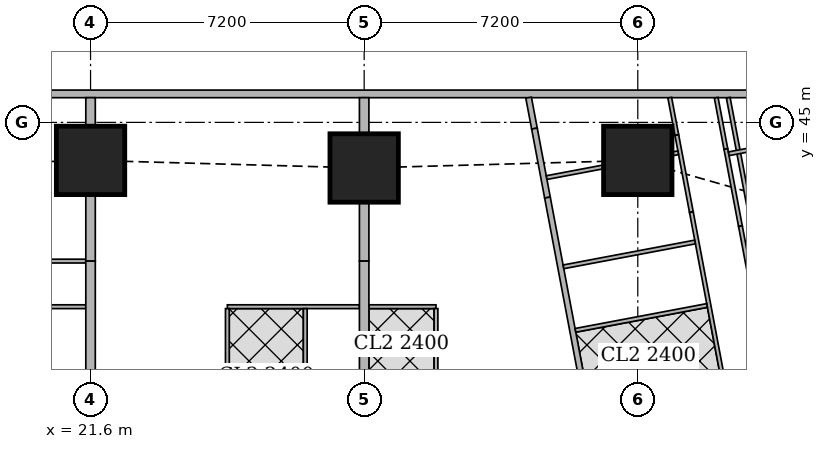
"""IFC4 building model, lengths in metres.
Left out: names, types, materials, properties, quantities, classifications, styles, units other than length and angle.
Written with IfcOpenShell. Run it as: python <this file> out.ifc"""

import sys

from ifc_helpers import new_model, si_unit, direction, frame, frame_2d, origin, origin_2d, place, context, subcontext, project, spatial, rectangle, extrude, element, fill, save


model = new_model("IFC4")
c1 = context("Model", 3, precision=1e-05, world=origin(), true_north=direction((0.0, 1.0)))
c2 = subcontext(c1, "Body", "Model", "MODEL_VIEW")
j1 = project(units=[si_unit("LENGTHUNIT", "METRE"), si_unit("PLANEANGLEUNIT", "RADIAN")], contexts=[c1])
p1 = place(None, origin())
s1 = spatial("IfcSite", under=j1, at=p1, CompositionType="ELEMENT")
p2 = place(p1, origin())
s2 = spatial("IfcBuilding", under=s1, at=p2, CompositionType="ELEMENT")
p3 = place(p2, frame((0.0, 0.0, 180.8)))
s3 = spatial("IfcBuildingStorey", under=s2, at=p3, CompositionType="ELEMENT", Elevation=180.8)
for number, where, z_axis, x_axis in (
    (1, (21.6, 44.0, 0.0), (0.0, 0.0, 1.0), (1.0, 0.0, 0.0)),
    (2, (28.8, 43.8, 0.0), (0.0, 0.0, 1.0), (1.0, 0.0, 0.0)),
    (3, (36.0, 44.0, 0.0), (0.0, 0.0, 1.0), (1.0, 0.0, 0.0)),
):
    element("IfcColumn", number, at=place(p3, frame(where, z_axis=z_axis, x_axis=x_axis)), inside=s3, PredefinedType="COLUMN", context=c2, shape_type="SweptSolid", body=[
        extrude(rectangle(XDim=1.8, YDim=1.8, at=origin_2d()), origin(), (0.0, 0.0, 1.0), 3.75),
    ])
p4 = place(p3, frame((40.106, 45.75, 0.0), z_axis=(0.0, 0.0, 1.0), x_axis=(-1.0, 0.0, 0.0)))
e4 = element("IfcWall", 4, at=p4, inside=s3, PredefinedType="SOLIDWALL", context=c2, shape_type="SweptSolid", body=[
    extrude(rectangle(XDim=37.943, YDim=0.2, at=frame_2d((18.971, 0.0))), origin(), (0.0, 0.0, 1.0), 3.5),
])
p5 = place(p4, frame((8.606, 0.0, 0.9)))
e5 = element("IfcOpeningElement", 5, at=p5, cuts=e4, PredefinedType="OPENING", context=c2, shape_type="SweptSolid", body=[
    extrude(rectangle(XDim=1.8, YDim=1.5, at=frame_2d((0.9, 0.75))), frame((0.0, 0.11, 0.0), z_axis=(0.0, -1.0, 0.0), x_axis=(1.0, 0.0, 0.0)), (0.0, 0.0, 1.0), 0.22),
])
p6 = place(p4, frame((12.206, 0.0, 0.9)))
e6 = element("IfcOpeningElement", 6, at=p6, cuts=e4, PredefinedType="OPENING", context=c2, shape_type="SweptSolid", body=[
    extrude(rectangle(XDim=1.8, YDim=1.5, at=frame_2d((0.9, 0.75))), frame((0.0, 0.11, 0.0), z_axis=(0.0, -1.0, 0.0), x_axis=(1.0, 0.0, 0.0)), (0.0, 0.0, 1.0), 0.22),
])
p7 = place(p4, frame((15.806, 0.0, 0.9)))
e7 = element("IfcOpeningElement", 7, at=p7, cuts=e4, PredefinedType="OPENING", context=c2, shape_type="SweptSolid", body=[
    extrude(rectangle(XDim=1.8, YDim=1.5, at=frame_2d((0.9, 0.75))), frame((0.0, 0.11, 0.0), z_axis=(0.0, -1.0, 0.0), x_axis=(1.0, 0.0, 0.0)), (0.0, 0.0, 1.0), 0.22),
])
p8 = place(p4, frame((19.406, 0.0, 0.9)))
e8 = element("IfcOpeningElement", 8, at=p8, cuts=e4, PredefinedType="OPENING", context=c2, shape_type="SweptSolid", body=[
    extrude(rectangle(XDim=1.8, YDim=1.5, at=frame_2d((0.9, 0.75))), frame((0.0, 0.11, 0.0), z_axis=(0.0, -1.0, 0.0), x_axis=(1.0, 0.0, 0.0)), (0.0, 0.0, 1.0), 0.22),
])
p9 = place(p4, frame((23.006, 0.0, 0.9)))
e9 = element("IfcOpeningElement", 9, at=p9, cuts=e4, PredefinedType="OPENING", context=c2, shape_type="SweptSolid", body=[
    extrude(rectangle(XDim=1.8, YDim=1.5, at=frame_2d((0.9, 0.75))), frame((0.0, 0.11, 0.0), z_axis=(0.0, -1.0, 0.0), x_axis=(1.0, 0.0, 0.0)), (0.0, 0.0, 1.0), 0.22),
])
p10 = place(p4, frame((26.606, 0.0, 0.9)))
e10 = element("IfcOpeningElement", 10, at=p10, cuts=e4, PredefinedType="OPENING", context=c2, shape_type="SweptSolid", body=[
    extrude(rectangle(XDim=1.8, YDim=1.5, at=frame_2d((0.9, 0.75))), frame((0.0, 0.11, 0.0), z_axis=(0.0, -1.0, 0.0), x_axis=(1.0, 0.0, 0.0)), (0.0, 0.0, 1.0), 0.22),
])
p11 = place(p3, frame((33.127, 45.65, 0.0), z_axis=(0.0, 0.0, 1.0), x_axis=(0.186176514576, -0.982516313056, 0.0)))
e11 = element("IfcWall", 11, at=p11, inside=s3, PredefinedType="SOLIDWALL", context=c2, shape_type="SweptSolid", body=[
    extrude(rectangle(XDim=0.827, YDim=0.15, at=frame_2d((0.414, 0.0))), origin(), (0.0, 0.0, 1.0), 3.5),
])
p12 = place(p3, frame((33.281, 44.837, 0.0), z_axis=(0.0, 0.0, 1.0), x_axis=(0.185198323004, -0.982701165745, 0.0)))
e12 = element("IfcWall", 12, at=p12, inside=s3, PredefinedType="SOLIDWALL", context=c2, shape_type="SweptSolid", body=[
    extrude(rectangle(XDim=1.847, YDim=0.15, at=frame_2d((0.923, 0.0))), origin(), (0.0, 0.0, 1.0), 2.1),
])
p13 = place(p3, frame((33.623, 43.022, 0.0), z_axis=(0.0, 0.0, 1.0), x_axis=(0.185596841028, -0.98262597798, 0.0)))
e13 = element("IfcWall", 13, at=p13, inside=s3, PredefinedType="SOLIDWALL", context=c2, shape_type="SweptSolid", body=[
    extrude(rectangle(XDim=41.66, YDim=0.15, at=frame_2d((20.83, 0.0))), origin(), (0.0, 0.0, 1.0), 2.5),
])
p14 = place(p13, frame((8.034, 0.0, 0.0)))
e14 = element("IfcOpeningElement", 14, at=p14, cuts=e13, PredefinedType="OPENING", context=c2, shape_type="SweptSolid", body=[
    extrude(rectangle(XDim=1.0, YDim=2.1, at=frame_2d((0.5, 1.05))), frame((0.0, 0.085, 0.0), z_axis=(0.0, -1.0, 0.0), x_axis=(1.0, 0.0, 0.0)), (0.0, 0.0, 1.0), 0.17),
])
p15 = place(p13, frame((12.611, 0.0, 0.0)))
e15 = element("IfcOpeningElement", 15, at=p15, cuts=e13, PredefinedType="OPENING", context=c2, shape_type="SweptSolid", body=[
    extrude(rectangle(XDim=1.0, YDim=2.1, at=frame_2d((0.5, 1.05))), frame((0.0, 0.085, 0.0), z_axis=(0.0, -1.0, 0.0), x_axis=(1.0, 0.0, 0.0)), (0.0, 0.0, 1.0), 0.17),
])
p16 = place(p13, frame((20.242, 0.0, 0.0)))
e16 = element("IfcOpeningElement", 16, at=p16, cuts=e13, PredefinedType="OPENING", context=c2, shape_type="SweptSolid", body=[
    extrude(rectangle(XDim=1.0, YDim=2.1, at=frame_2d((0.5, 1.05))), frame((0.0, 0.085, 0.0), z_axis=(0.0, -1.0, 0.0), x_axis=(1.0, 0.0, 0.0)), (0.0, 0.0, 1.0), 0.17),
])
p17 = place(p13, frame((31.206, 0.0, 0.0)))
e17 = element("IfcOpeningElement", 17, at=p17, cuts=e13, PredefinedType="OPENING", context=c2, shape_type="SweptSolid", body=[
    extrude(rectangle(XDim=1.0, YDim=2.1, at=frame_2d((0.5, 1.05))), frame((0.0, 0.085, 0.0), z_axis=(0.0, -1.0, 0.0), x_axis=(1.0, 0.0, 0.0)), (0.0, 0.0, 1.0), 0.17),
])
p18 = place(p3, frame((39.054, 42.085, 0.0), z_axis=(0.0, 0.0, 1.0), x_axis=(-0.185791584218, 0.982589175207, 0.0)))
e18 = element("IfcWall", 18, at=p18, inside=s3, PredefinedType="PARTITIONING", context=c2, shape_type="SweptSolid", body=[
    extrude(rectangle(XDim=3.628, YDim=0.1, at=frame_2d((1.814, 0.0))), origin(), (0.0, 0.0, 1.0), 2.1),
])
p19 = place(p3, frame((38.063, 45.65, 0.0), z_axis=(0.0, 0.0, 1.0), x_axis=(0.185456359766, -0.982652501458, 0.0)))
e19 = element("IfcWall", 19, at=p19, inside=s3, PredefinedType="PARTITIONING", context=c2, shape_type="SweptSolid", body=[
    extrude(rectangle(XDim=1.376, YDim=0.1, at=frame_2d((0.688, 0.0))), origin(), (0.0, 0.0, 1.0), 3.5),
])
p20 = place(p3, frame((38.318, 44.298, 0.0), z_axis=(0.0, 0.0, 1.0), x_axis=(0.185481135188, -0.982647825261, 0.0)))
e20 = element("IfcWall", 20, at=p20, inside=s3, PredefinedType="PARTITIONING", context=c2, shape_type="SweptSolid", body=[
    extrude(rectangle(XDim=2.064, YDim=0.1, at=frame_2d((1.032, 0.0))), origin(), (0.0, 0.0, 1.0), 2.1),
])
p21 = place(p3, frame((38.701, 42.27, 0.0), z_axis=(0.0, 0.0, 1.0), x_axis=(0.185474244877, -0.982649125826, 0.0)))
e21 = element("IfcWall", 21, at=p21, inside=s3, PredefinedType="PARTITIONING", context=c2, shape_type="SweptSolid", body=[
    extrude(rectangle(XDim=5.494, YDim=0.1, at=frame_2d((2.747, 0.0))), origin(), (0.0, 0.0, 1.0), 3.5),
])
p22 = place(p21, frame((3.085, 0.0, 0.0)))
e22 = element("IfcOpeningElement", 22, at=p22, cuts=e21, PredefinedType="OPENING", context=c2, shape_type="SweptSolid", body=[
    extrude(rectangle(XDim=0.9, YDim=2.1, at=frame_2d((0.45, 1.05))), frame((0.0, 0.06, 0.0), z_axis=(0.0, -1.0, 0.0), x_axis=(1.0, 0.0, 0.0)), (0.0, 0.0, 1.0), 0.12),
])
p23 = place(p3, frame((36.841, 45.65, 0.0), z_axis=(0.0, 0.0, 1.0), x_axis=(0.185789875365, -0.982589498322, 0.0)))
e23 = element("IfcWall", 23, at=p23, inside=s3, PredefinedType="PARTITIONING", context=c2, shape_type="SweptSolid", body=[
    extrude(rectangle(XDim=1.001, YDim=0.1, at=frame_2d((0.5, 0.0))), origin(), (0.0, 0.0, 1.0), 3.5),
])
p24 = place(p3, frame((37.027, 44.666, 0.0), z_axis=(0.0, 0.0, 1.0), x_axis=(0.1855674151, -0.982631535446, 0.0)))
e24 = element("IfcWall", 24, at=p24, inside=s3, PredefinedType="PARTITIONING", context=c2, shape_type="SweptSolid", body=[
    extrude(rectangle(XDim=2.063, YDim=0.1, at=frame_2d((1.031, 0.0))), origin(), (0.0, 0.0, 1.0), 2.1),
])
p25 = place(p3, frame((37.41, 42.639, 0.0), z_axis=(0.0, 0.0, 1.0), x_axis=(0.185579683022, -0.982629218601, 0.0)))
e25 = element("IfcWall", 25, at=p25, inside=s3, PredefinedType="PARTITIONING", context=c2, shape_type="SweptSolid", body=[
    extrude(rectangle(XDim=4.737, YDim=0.1, at=frame_2d((2.369, 0.0))), origin(), (0.0, 0.0, 1.0), 3.5),
])
p26 = place(p25, frame((3.189, 0.0, 0.0)))
e26 = element("IfcOpeningElement", 26, at=p26, cuts=e25, PredefinedType="OPENING", context=c2, shape_type="SweptSolid", body=[
    extrude(rectangle(XDim=0.9, YDim=2.1, at=frame_2d((0.45, 1.05))), frame((0.0, 0.06, 0.0), z_axis=(0.0, -1.0, 0.0), x_axis=(1.0, 0.0, 0.0)), (0.0, 0.0, 1.0), 0.12),
])
p27 = place(p25, frame((1.191, 0.0, 0.0)))
e27 = element("IfcOpeningElement", 27, at=p27, cuts=e25, PredefinedType="OPENING", context=c2, shape_type="SweptSolid", body=[
    extrude(rectangle(XDim=0.9, YDim=2.1, at=frame_2d((0.45, 1.05))), frame((0.0, 0.06, 0.0), z_axis=(0.0, -1.0, 0.0), x_axis=(1.0, 0.0, 0.0)), (0.0, 0.0, 1.0), 0.12),
])
p28 = place(p3, frame((41.968, 44.85, 0.0), z_axis=(0.0, 0.0, 1.0), x_axis=(-0.98258614234, -0.185807623311, 0.0)))
e28 = element("IfcWall", 28, at=p28, inside=s3, PredefinedType="PARTITIONING", context=c2, shape_type="SweptSolid", body=[
    extrude(rectangle(XDim=3.638, YDim=0.1, at=frame_2d((1.819, 0.0))), origin(), (0.0, 0.0, 1.0), 2.1),
])
p29 = place(p3, frame((37.064, 44.201, 0.0), z_axis=(0.0, 0.0, 1.0), x_axis=(-0.982960250751, -0.183818240236, 0.0)))
e29 = element("IfcWall", 29, at=p29, inside=s3, PredefinedType="PARTITIONING", context=c2, shape_type="SweptSolid", body=[
    extrude(rectangle(XDim=0.157, YDim=0.1, at=frame_2d((0.078, 0.0))), origin(), (0.0, 0.0, 1.0), 2.1),
])
p30 = place(p3, frame((35.09, 43.828, 0.0), z_axis=(0.0, 0.0, 1.0), x_axis=(-0.982683801717, -0.185290436461, 0.0)))
e30 = element("IfcWall", 30, at=p30, inside=s3, PredefinedType="PARTITIONING", context=c2, shape_type="SweptSolid", body=[
    extrude(rectangle(XDim=1.515, YDim=0.1, at=frame_2d((0.758, 0.0))), origin(), (0.0, 0.0, 1.0), 2.1),
])
p31 = place(p3, frame((37.823, 40.182, 0.0), z_axis=(0.0, 0.0, 1.0), x_axis=(-0.98263926043, -0.185526504472, 0.0)))
e31 = element("IfcWall", 31, at=p31, inside=s3, PredefinedType="PARTITIONING", context=c2, shape_type="SweptSolid", body=[
    extrude(rectangle(XDim=3.524, YDim=0.1, at=frame_2d((1.762, 0.0))), origin(), (0.0, 0.0, 1.0), 3.5),
])
p32 = place(p3, frame((37.507, 41.853, 0.0), z_axis=(0.0, 0.0, 1.0), x_axis=(-0.982629014545, -0.18558076348, 0.0)))
e32 = element("IfcWall", 32, at=p32, inside=s3, PredefinedType="PARTITIONING", context=c2, shape_type="SweptSolid", body=[
    extrude(rectangle(XDim=3.524, YDim=0.1, at=frame_2d((1.762, 0.0))), origin(), (0.0, 0.0, 1.0), 3.5),
])
p33 = place(p32, frame((1.324, 0.0, 0.0)))
e33 = element("IfcOpeningElement", 33, at=p33, cuts=e32, PredefinedType="OPENING", context=c2, shape_type="SweptSolid", body=[
    extrude(rectangle(XDim=0.9, YDim=2.1, at=frame_2d((0.45, 1.05))), frame((0.0, 0.06, 0.0), z_axis=(0.0, -1.0, 0.0), x_axis=(1.0, 0.0, 0.0)), (0.0, 0.0, 1.0), 0.12),
])
p34 = place(p3, frame((14.4, 41.35, 0.0), z_axis=(0.0, 0.0, 1.0), x_axis=(1.0, 0.0, 0.0)))
e34 = element("IfcWall", 34, at=p34, inside=s3, PredefinedType="PARTITIONING", context=c2, shape_type="SweptSolid", body=[
    extrude(rectangle(XDim=7.075, YDim=0.1, at=frame_2d((3.538, 0.0))), origin(), (0.0, 0.0, 1.0), 3.5),
])
p35 = place(p34, frame((0.2, 0.0, 0.0)))
e35 = element("IfcOpeningElement", 35, at=p35, cuts=e34, PredefinedType="OPENING", context=c2, shape_type="SweptSolid", body=[
    extrude(rectangle(XDim=0.9, YDim=2.1, at=frame_2d((0.45, 1.05))), frame((0.0, 0.06, 0.0), z_axis=(0.0, -1.0, 0.0), x_axis=(1.0, 0.0, 0.0)), (0.0, 0.0, 1.0), 0.12),
])
p36 = place(p34, frame((3.8, 0.0, 0.0)))
e36 = element("IfcOpeningElement", 36, at=p36, cuts=e34, PredefinedType="OPENING", context=c2, shape_type="SweptSolid", body=[
    extrude(rectangle(XDim=0.9, YDim=2.1, at=frame_2d((0.45, 1.05))), frame((0.0, 0.06, 0.0), z_axis=(0.0, -1.0, 0.0), x_axis=(1.0, 0.0, 0.0)), (0.0, 0.0, 1.0), 0.12),
])
p37 = place(p3, frame((14.4, 40.15, 0.0), z_axis=(0.0, 0.0, 1.0), x_axis=(1.0, 0.0, 0.0)))
e37 = element("IfcWall", 37, at=p37, inside=s3, PredefinedType="PARTITIONING", context=c2, shape_type="SweptSolid", body=[
    extrude(rectangle(XDim=7.075, YDim=0.1, at=frame_2d((3.538, 0.0))), origin(), (0.0, 0.0, 1.0), 3.5),
])
p38 = place(p37, frame((0.575, 0.0, 0.0)))
e38 = element("IfcOpeningElement", 38, at=p38, cuts=e37, PredefinedType="OPENING", context=c2, shape_type="SweptSolid", body=[
    extrude(rectangle(XDim=0.9, YDim=2.1, at=frame_2d((0.45, 1.05))), frame((0.0, 0.06, 0.0), z_axis=(0.0, -1.0, 0.0), x_axis=(1.0, 0.0, 0.0)), (0.0, 0.0, 1.0), 0.12),
])
p39 = place(p37, frame((3.95, 0.0, 0.0)))
e39 = element("IfcOpeningElement", 39, at=p39, cuts=e37, PredefinedType="OPENING", context=c2, shape_type="SweptSolid", body=[
    extrude(rectangle(XDim=0.9, YDim=2.1, at=frame_2d((0.45, 1.05))), frame((0.0, 0.06, 0.0), z_axis=(0.0, -1.0, 0.0), x_axis=(1.0, 0.0, 0.0)), (0.0, 0.0, 1.0), 0.12),
])
p40 = place(p37, frame((2.375, 0.0, 0.0)))
e40 = element("IfcOpeningElement", 40, at=p40, cuts=e37, PredefinedType="OPENING", context=c2, shape_type="SweptSolid", body=[
    extrude(rectangle(XDim=0.9, YDim=2.1, at=frame_2d((0.45, 1.05))), frame((0.0, 0.06, 0.0), z_axis=(0.0, -1.0, 0.0), x_axis=(1.0, 0.0, 0.0)), (0.0, 0.0, 1.0), 0.12),
])
p41 = place(p37, frame((5.75, 0.0, 0.0)))
e41 = element("IfcOpeningElement", 41, at=p41, cuts=e37, PredefinedType="OPENING", context=c2, shape_type="SweptSolid", body=[
    extrude(rectangle(XDim=0.9, YDim=2.1, at=frame_2d((0.45, 1.05))), frame((0.0, 0.06, 0.0), z_axis=(0.0, -1.0, 0.0), x_axis=(1.0, 0.0, 0.0)), (0.0, 0.0, 1.0), 0.12),
])
p42 = place(p3, frame((25.2, 40.15, 0.0), z_axis=(0.0, 0.0, 1.0), x_axis=(1.0, 0.0, 0.0)))
e42 = element("IfcWall", 42, at=p42, inside=s3, PredefinedType="PARTITIONING", context=c2, shape_type="SweptSolid", body=[
    extrude(rectangle(XDim=3.475, YDim=0.1, at=frame_2d((1.738, 0.0))), origin(), (0.0, 0.0, 1.0), 3.5),
])
p43 = place(p42, frame((0.575, 0.0, 0.0)))
e43 = element("IfcOpeningElement", 43, at=p43, cuts=e42, PredefinedType="OPENING", context=c2, shape_type="SweptSolid", body=[
    extrude(rectangle(XDim=0.9, YDim=2.1, at=frame_2d((0.45, 1.05))), frame((0.0, 0.06, 0.0), z_axis=(0.0, -1.0, 0.0), x_axis=(1.0, 0.0, 0.0)), (0.0, 0.0, 1.0), 0.12),
])
p44 = place(p42, frame((2.375, 0.0, 0.0)))
e44 = element("IfcOpeningElement", 44, at=p44, cuts=e42, PredefinedType="OPENING", context=c2, shape_type="SweptSolid", body=[
    extrude(rectangle(XDim=0.9, YDim=2.1, at=frame_2d((0.45, 1.05))), frame((0.0, 0.06, 0.0), z_axis=(0.0, -1.0, 0.0), x_axis=(1.0, 0.0, 0.0)), (0.0, 0.0, 1.0), 0.12),
])
for number, where, z_axis, x_axis in (
    (45, (25.2, 36.575, 0.0), (0.0, 0.0, 1.0), (0.0, 1.0, 0.0)),
    (46, (27.25, 36.575, 0.0), (0.0, 0.0, 1.0), (0.0, 1.0, 0.0)),
):
    element("IfcWall", number, at=place(p3, frame(where, z_axis=z_axis, x_axis=x_axis)), inside=s3, PredefinedType="PARTITIONING", context=c2, shape_type="SweptSolid", body=[
        extrude(rectangle(XDim=3.525, YDim=0.1, at=frame_2d((1.763, 0.0))), origin(), (0.0, 0.0, 1.0), 3.5),
    ])
p45 = place(p3, frame((21.6, 41.35, 0.0), z_axis=(0.0, 0.0, 1.0), x_axis=(0.0, 1.0, 0.0)))
e47 = element("IfcWall", 47, at=p45, inside=s3, PredefinedType="SOLIDWALL", context=c2, shape_type="SweptSolid", body=[
    extrude(rectangle(XDim=1.749, YDim=0.25, at=frame_2d((0.875, 0.0))), origin(), (0.0, 0.0, 1.0), 2.1),
])
p46 = place(p3, frame((21.6, 44.901, 0.0), z_axis=(0.0, 0.0, 1.0), x_axis=(0.0, 1.0, 0.0)))
e48 = element("IfcWall", 48, at=p46, inside=s3, PredefinedType="SOLIDWALL", context=c2, shape_type="SweptSolid", body=[
    extrude(rectangle(XDim=0.749, YDim=0.25, at=frame_2d((0.375, 0.0))), origin(), (0.0, 0.0, 1.0), 2.1),
])
p47 = place(p3, frame((21.6, 38.251, 0.0), z_axis=(0.0, 0.0, 1.0), x_axis=(0.0, 1.0, 0.0)))
e49 = element("IfcWall", 49, at=p47, inside=s3, PredefinedType="SOLIDWALL", context=c2, shape_type="SweptSolid", body=[
    extrude(rectangle(XDim=3.099, YDim=0.25, at=frame_2d((1.55, 0.0))), origin(), (0.0, 0.0, 1.0), 3.5),
])
p48 = place(p3, frame((28.925, 40.15, 0.0), z_axis=(0.0, 0.0, 1.0), x_axis=(1.0, 0.0, 0.0)))
e50 = element("IfcWall", 50, at=p48, inside=s3, PredefinedType="PARTITIONING", context=c2, shape_type="SweptSolid", body=[
    extrude(rectangle(XDim=1.765, YDim=0.1, at=frame_2d((0.882, 0.0))), origin(), (0.0, 0.0, 1.0), 3.5),
])
p49 = place(p48, frame((0.375, 0.0, 0.0)))
e51 = element("IfcOpeningElement", 51, at=p49, cuts=e50, PredefinedType="OPENING", context=c2, shape_type="SweptSolid", body=[
    extrude(rectangle(XDim=0.9, YDim=2.1, at=frame_2d((0.45, 1.05))), frame((0.0, 0.06, 0.0), z_axis=(0.0, -1.0, 0.0), x_axis=(1.0, 0.0, 0.0)), (0.0, 0.0, 1.0), 0.12),
])
p50 = place(p3, frame((30.69, 36.575, 0.0), z_axis=(0.0, 0.0, 1.0), x_axis=(0.0, 1.0, 0.0)))
e52 = element("IfcWall", 52, at=p50, inside=s3, PredefinedType="PARTITIONING", context=c2, shape_type="SweptSolid", body=[
    extrude(rectangle(XDim=3.525, YDim=0.1, at=frame_2d((1.763, 0.0))), origin(), (0.0, 0.0, 1.0), 3.5),
])
p51 = place(p3, frame((28.8, 41.35, 0.0), z_axis=(0.0, 0.0, 1.0), x_axis=(0.0, 1.0, 0.0)))
e53 = element("IfcWall", 53, at=p51, inside=s3, PredefinedType="SOLIDWALL", context=c2, shape_type="SweptSolid", body=[
    extrude(rectangle(XDim=1.549, YDim=0.25, at=frame_2d((0.774, 0.0))), origin(), (0.0, 0.0, 1.0), 2.1),
])
p52 = place(p3, frame((28.8, 44.701, 0.0), z_axis=(0.0, 0.0, 1.0), x_axis=(0.0, 1.0, 0.0)))
e54 = element("IfcWall", 54, at=p52, inside=s3, PredefinedType="SOLIDWALL", context=c2, shape_type="SweptSolid", body=[
    extrude(rectangle(XDim=0.949, YDim=0.25, at=frame_2d((0.475, 0.0))), origin(), (0.0, 0.0, 1.0), 2.1),
])
p53 = place(p3, frame((28.8, 38.251, 0.0), z_axis=(0.0, 0.0, 1.0), x_axis=(0.0, 1.0, 0.0)))
e55 = element("IfcWall", 55, at=p53, inside=s3, PredefinedType="SOLIDWALL", context=c2, shape_type="SweptSolid", body=[
    extrude(rectangle(XDim=3.099, YDim=0.25, at=frame_2d((1.55, 0.0))), origin(), (0.0, 0.0, 1.0), 3.5),
])
p54 = place(p5, origin())
e56 = element("IfcWindow", 56, at=p54, inside=s3, PartitioningType="SINGLE_PANEL", PredefinedType="WINDOW", context=c2, shape_type="SweptSolid", body=[
    extrude(rectangle(XDim=1.8, YDim=1.5, at=frame_2d((0.9, 0.75))), frame((0.0, 0.03, 0.0), z_axis=(0.0, -1.0, 0.0), x_axis=(1.0, 0.0, 0.0)), (0.0, 0.0, 1.0), 0.06),
])
fill(e5, e56)
p55 = place(p6, origin())
e57 = element("IfcWindow", 57, at=p55, inside=s3, PartitioningType="SINGLE_PANEL", PredefinedType="WINDOW", context=c2, shape_type="SweptSolid", body=[
    extrude(rectangle(XDim=1.8, YDim=1.5, at=frame_2d((0.9, 0.75))), frame((0.0, 0.03, 0.0), z_axis=(0.0, -1.0, 0.0), x_axis=(1.0, 0.0, 0.0)), (0.0, 0.0, 1.0), 0.06),
])
fill(e6, e57)
p56 = place(p7, origin())
e58 = element("IfcWindow", 58, at=p56, inside=s3, PartitioningType="SINGLE_PANEL", PredefinedType="WINDOW", context=c2, shape_type="SweptSolid", body=[
    extrude(rectangle(XDim=1.8, YDim=1.5, at=frame_2d((0.9, 0.75))), frame((0.0, 0.03, 0.0), z_axis=(0.0, -1.0, 0.0), x_axis=(1.0, 0.0, 0.0)), (0.0, 0.0, 1.0), 0.06),
])
fill(e7, e58)
p57 = place(p8, origin())
e59 = element("IfcWindow", 59, at=p57, inside=s3, PartitioningType="SINGLE_PANEL", PredefinedType="WINDOW", context=c2, shape_type="SweptSolid", body=[
    extrude(rectangle(XDim=1.8, YDim=1.5, at=frame_2d((0.9, 0.75))), frame((0.0, 0.03, 0.0), z_axis=(0.0, -1.0, 0.0), x_axis=(1.0, 0.0, 0.0)), (0.0, 0.0, 1.0), 0.06),
])
fill(e8, e59)
p58 = place(p26, origin())
e60 = element("IfcDoor", 60, at=p58, inside=s3, OperationType="SINGLE_SWING_LEFT", PredefinedType="DOOR", context=c2, shape_type="SweptSolid", body=[
    extrude(rectangle(XDim=0.9, YDim=2.1, at=frame_2d((0.45, 1.05))), frame((0.0, 0.025, 0.0), z_axis=(0.0, -1.0, 0.0), x_axis=(1.0, 0.0, 0.0)), (0.0, 0.0, 1.0), 0.05),
])
fill(e26, e60)
p59 = place(p27, origin())
e61 = element("IfcDoor", 61, at=p59, inside=s3, OperationType="SINGLE_SWING_LEFT", PredefinedType="DOOR", context=c2, shape_type="SweptSolid", body=[
    extrude(rectangle(XDim=0.9, YDim=2.1, at=frame_2d((0.45, 1.05))), frame((0.0, 0.025, 0.0), z_axis=(0.0, -1.0, 0.0), x_axis=(1.0, 0.0, 0.0)), (0.0, 0.0, 1.0), 0.05),
])
fill(e27, e61)
p60 = place(p33, origin())
e62 = element("IfcDoor", 62, at=p60, inside=s3, OperationType="SINGLE_SWING_RIGHT", PredefinedType="DOOR", context=c2, shape_type="SweptSolid", body=[
    extrude(rectangle(XDim=0.9, YDim=2.1, at=frame_2d((0.45, 1.05))), frame((0.0, 0.025, 0.0), z_axis=(0.0, -1.0, 0.0), x_axis=(1.0, 0.0, 0.0)), (0.0, 0.0, 1.0), 0.05),
])
fill(e33, e62)
p61 = place(p41, origin())
e63 = element("IfcDoor", 63, at=p61, inside=s3, OperationType="SINGLE_SWING_LEFT", PredefinedType="DOOR", context=c2, shape_type="SweptSolid", body=[
    extrude(rectangle(XDim=0.9, YDim=2.1, at=frame_2d((0.45, 1.05))), frame((0.0, 0.025, 0.0), z_axis=(0.0, -1.0, 0.0), x_axis=(1.0, 0.0, 0.0)), (0.0, 0.0, 1.0), 0.05),
])
fill(e41, e63)
p62 = place(p43, origin())
e64 = element("IfcDoor", 64, at=p62, inside=s3, OperationType="SINGLE_SWING_RIGHT", PredefinedType="DOOR", context=c2, shape_type="SweptSolid", body=[
    extrude(rectangle(XDim=0.9, YDim=2.1, at=frame_2d((0.45, 1.05))), frame((0.0, 0.025, 0.0), z_axis=(0.0, -1.0, 0.0), x_axis=(1.0, 0.0, 0.0)), (0.0, 0.0, 1.0), 0.05),
])
fill(e43, e64)
p63 = place(p44, origin())
e65 = element("IfcDoor", 65, at=p63, inside=s3, OperationType="SINGLE_SWING_LEFT", PredefinedType="DOOR", context=c2, shape_type="SweptSolid", body=[
    extrude(rectangle(XDim=0.9, YDim=2.1, at=frame_2d((0.45, 1.05))), frame((0.0, 0.025, 0.0), z_axis=(0.0, -1.0, 0.0), x_axis=(1.0, 0.0, 0.0)), (0.0, 0.0, 1.0), 0.05),
])
fill(e44, e65)
p64 = place(p49, origin())
e66 = element("IfcDoor", 66, at=p64, inside=s3, OperationType="SINGLE_SWING_RIGHT", PredefinedType="DOOR", context=c2, shape_type="SweptSolid", body=[
    extrude(rectangle(XDim=0.9, YDim=2.1, at=frame_2d((0.45, 1.05))), frame((0.0, 0.025, 0.0), z_axis=(0.0, -1.0, 0.0), x_axis=(1.0, 0.0, 0.0)), (0.0, 0.0, 1.0), 0.05),
])
fill(e51, e66)
save(model, sys.argv[1])
